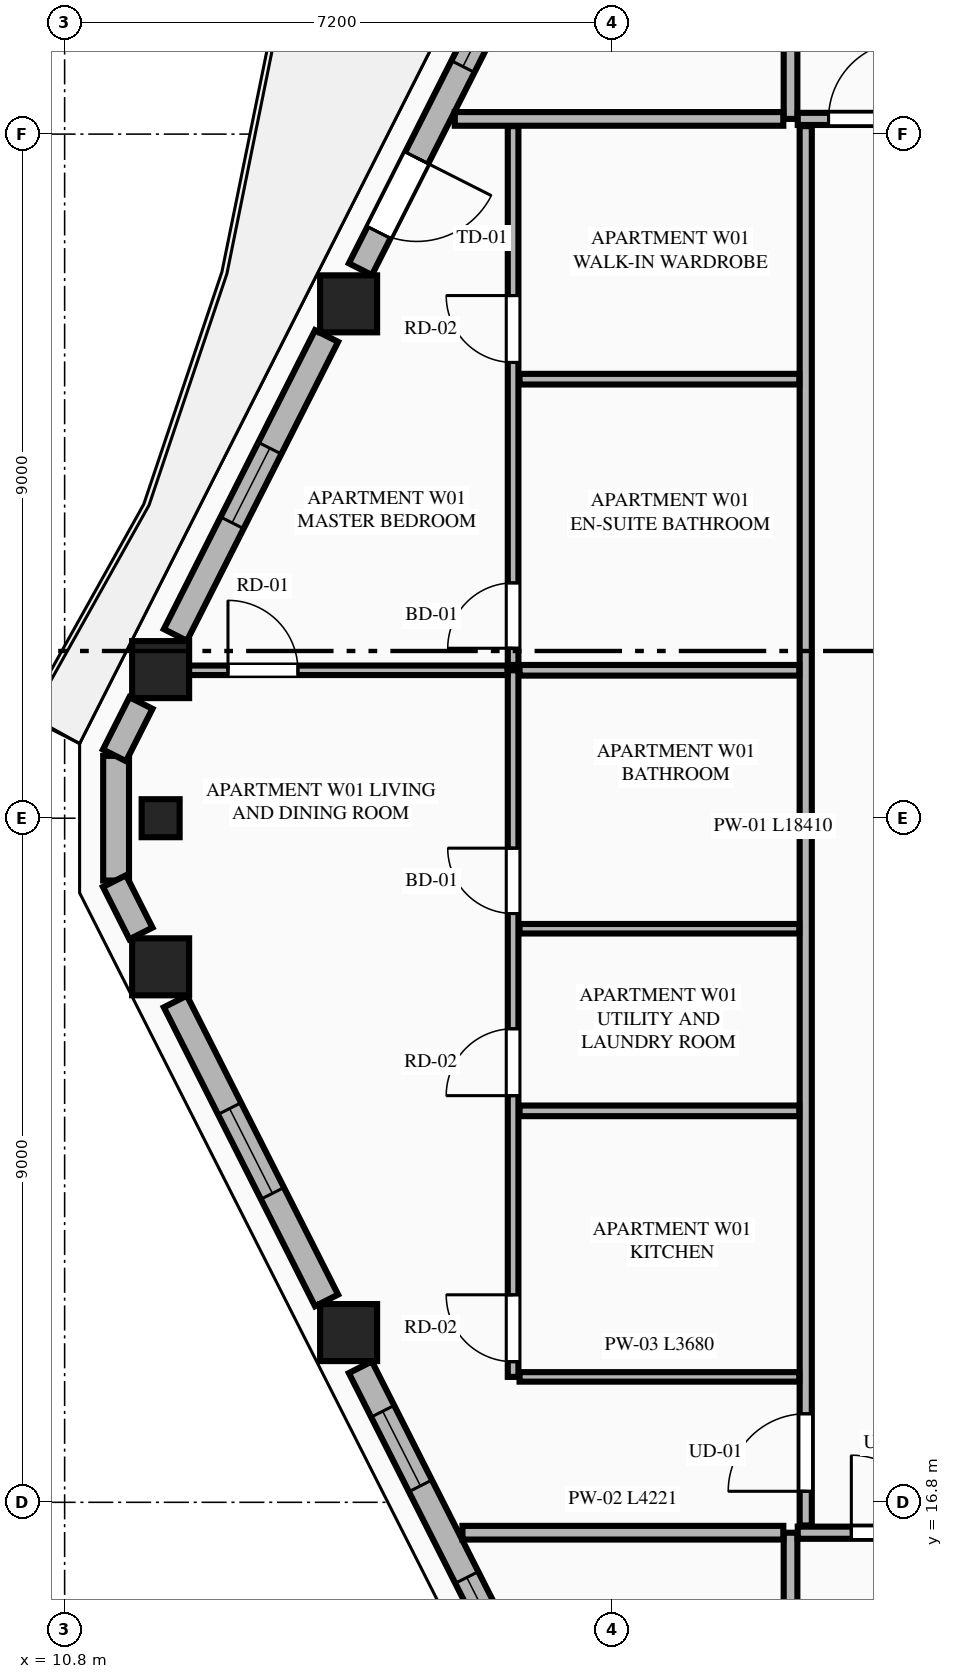
"""IFC4 building model, lengths in metres.
Left out: names, types, materials, properties, quantities, classifications, styles, units other than length and angle.
Written with IfcOpenShell. Run it as: python <this file> out.ifc"""

import sys

from ifc_helpers import new_model, si_unit, direction, frame, frame_2d, origin, origin_2d, place, context, subcontext, project, spatial, rectangle, extrude, element, fill, save


model = new_model("IFC4")
c1 = context("Model", 3, precision=1e-05, world=origin(), true_north=direction((0.0, 1.0)))
c2 = subcontext(c1, "Body", "Model", "MODEL_VIEW")
j1 = project(units=[si_unit("LENGTHUNIT", "METRE"), si_unit("PLANEANGLEUNIT", "RADIAN")], contexts=[c1])
p1 = place(None, origin())
s1 = spatial("IfcSite", under=j1, at=p1, CompositionType="ELEMENT")
p2 = place(p1, origin())
s2 = spatial("IfcBuilding", under=s1, at=p2, CompositionType="ELEMENT")
p3 = place(p2, frame((0.0, 0.0, 230.65)))
s3 = spatial("IfcBuildingStorey", under=s2, at=p3, CompositionType="ELEMENT", Elevation=230.65)
for number, where, z_axis, x_axis in (
    (1, (14.536, 32.567, 0.0), (0.0, 0.0, 1.0), (1.0, 0.0, 0.0)),
    (2, (12.063, 27.755, 0.0), (0.0, 0.0, 1.0), (1.0, 0.0, 0.0)),
    (3, (12.063, 23.845, 0.0), (0.0, 0.0, 1.0), (1.0, 0.0, 0.0)),
    (4, (14.536, 19.033, 0.0), (0.0, 0.0, 1.0), (1.0, 0.0, 0.0)),
):
    element("IfcColumn", number, at=place(p3, frame(where, z_axis=z_axis, x_axis=x_axis)), inside=s3, PredefinedType="COLUMN", context=c2, shape_type="SweptSolid", body=[
        extrude(rectangle(XDim=0.75, YDim=0.75, at=origin_2d()), origin(), (0.0, 0.0, 1.0), 3.65),
    ])
p4 = place(p3, frame((12.063, 25.8, 0.0), z_axis=(0.0, 0.0, 1.0), x_axis=(0.0, -1.0, 0.0)))
e5 = element("IfcColumn", 5, at=p4, inside=s3, PredefinedType="PILASTER", context=c2, shape_type="SweptSolid", body=[
    extrude(rectangle(XDim=0.5, YDim=0.35, at=origin_2d()), origin(), (0.0, 0.0, 1.0), 3.65),
])
p5 = place(p3, frame((11.477, 26.62, 0.0), z_axis=(0.0, 0.0, 1.0), x_axis=(0.0, -1.0, 0.0)))
e6 = element("IfcWall", 6, at=p5, inside=s3, PredefinedType="STANDARD", context=c2, shape_type="SweptSolid", body=[
    extrude(rectangle(XDim=1.64, YDim=0.34, at=frame_2d((0.82, 0.0))), origin(), (0.0, 0.0, 1.0), 3.45),
])
p6 = place(p3, frame((16.768, 37.127, 0.0), z_axis=(0.0, 0.0, 1.0), x_axis=(-0.451581819983, -0.892229712496, 0.0)))
e7 = element("IfcWall", 7, at=p6, inside=s3, PredefinedType="STANDARD", context=c2, shape_type="SweptSolid", body=[
    extrude(rectangle(XDim=4.6, YDim=0.34, at=frame_2d((2.3, 0.0))), origin(), (0.0, 0.0, 1.0), 2.983),
])
p7 = place(p6, frame((2.958, 0.0, 0.0)))
e8 = element("IfcOpeningElement", 8, at=p7, cuts=e7, PredefinedType="OPENING", context=c2, shape_type="SweptSolid", body=[
    extrude(rectangle(XDim=1.1, YDim=2.25, at=frame_2d((0.55, 1.125))), frame((0.0, 0.18, 0.0), z_axis=(0.0, -1.0, 0.0), x_axis=(1.0, 0.0, 0.0)), (0.0, 0.0, 1.0), 0.36),
])
p8 = place(p6, frame((0.512, 0.0, 0.75)))
e9 = element("IfcOpeningElement", 9, at=p8, cuts=e7, PredefinedType="OPENING", context=c2, shape_type="SweptSolid", body=[
    extrude(rectangle(XDim=1.1, YDim=2.0, at=frame_2d((0.55, 1.0))), frame((0.0, 0.18, 0.0), z_axis=(0.0, -1.0, 0.0), x_axis=(1.0, 0.0, 0.0)), (0.0, 0.0, 1.0), 0.36),
])
p9 = place(p3, frame((14.246, 32.144, 0.0), z_axis=(0.0, 0.0, 1.0), x_axis=(-0.451285866323, -0.892379441077, 0.0)))
e10 = element("IfcWall", 10, at=p9, inside=s3, PredefinedType="STANDARD", context=c2, shape_type="SweptSolid", body=[
    extrude(rectangle(XDim=4.407, YDim=0.34, at=frame_2d((2.204, 0.0))), origin(), (0.0, 0.0, 1.0), 2.983),
])
p10 = place(p9, frame((1.654, 0.0, 0.75)))
e11 = element("IfcOpeningElement", 11, at=p10, cuts=e10, PredefinedType="OPENING", context=c2, shape_type="SweptSolid", body=[
    extrude(rectangle(XDim=1.1, YDim=2.0, at=frame_2d((0.55, 1.0))), frame((0.0, 0.18, 0.0), z_axis=(0.0, -1.0, 0.0), x_axis=(1.0, 0.0, 0.0)), (0.0, 0.0, 1.0), 0.36),
])
for number, where, z_axis, x_axis in (
    (12, (11.804, 27.316, 0.0), (0.0, 0.0, 1.0), (-0.451, -0.893, 0.0)),
    (13, (11.456, 24.973, 0.0), (0.0, 0.0, 1.0), (0.451, -0.893, 0.0)),
):
    element("IfcWall", number, at=place(p3, frame(where, z_axis=z_axis, x_axis=x_axis)), inside=s3, PredefinedType="STANDARD", context=c2, shape_type="SweptSolid", body=[
        extrude(rectangle(XDim=0.772, YDim=0.34, at=frame_2d((0.386, 0.0))), origin(), (0.0, 0.0, 1.0), 3.45),
    ])
p11 = place(p3, frame((12.257, 23.389, 0.0), z_axis=(0.0, 0.0, 1.0), x_axis=(0.45130817501, -0.892368158984, 0.0)))
e14 = element("IfcWall", 14, at=p11, inside=s3, PredefinedType="STANDARD", context=c2, shape_type="SweptSolid", body=[
    extrude(rectangle(XDim=4.407, YDim=0.34, at=frame_2d((2.204, 0.0))), origin(), (0.0, 0.0, 1.0), 2.983),
])
p12 = place(p11, frame((1.579, 0.0, 0.75)))
e15 = element("IfcOpeningElement", 15, at=p12, cuts=e14, PredefinedType="OPENING", context=c2, shape_type="SweptSolid", body=[
    extrude(rectangle(XDim=1.25, YDim=1.95, at=frame_2d((0.625, 0.975))), frame((0.0, 0.18, 0.0), z_axis=(0.0, -1.0, 0.0), x_axis=(1.0, 0.0, 0.0)), (0.0, 0.0, 1.0), 0.36),
])
p13 = place(p3, frame((14.691, 18.577, 0.0), z_axis=(0.0, 0.0, 1.0), x_axis=(0.451581819983, -0.892229712496, 0.0)))
e16 = element("IfcWall", 16, at=p13, inside=s3, PredefinedType="STANDARD", context=c2, shape_type="SweptSolid", body=[
    extrude(rectangle(XDim=4.6, YDim=0.34, at=frame_2d((2.3, 0.0))), origin(), (0.0, 0.0, 1.0), 2.983),
])
p14 = place(p13, frame((0.649, 0.0, 0.75)))
e17 = element("IfcOpeningElement", 17, at=p14, cuts=e16, PredefinedType="OPENING", context=c2, shape_type="SweptSolid", body=[
    extrude(rectangle(XDim=1.1, YDim=2.0, at=frame_2d((0.55, 1.0))), frame((0.0, 0.18, 0.0), z_axis=(0.0, -1.0, 0.0), x_axis=(1.0, 0.0, 0.0)), (0.0, 0.0, 1.0), 0.36),
])
p15 = place(p13, frame((3.1, 0.0, 0.75)))
e18 = element("IfcOpeningElement", 18, at=p15, cuts=e16, PredefinedType="OPENING", context=c2, shape_type="SweptSolid", body=[
    extrude(rectangle(XDim=1.1, YDim=2.0, at=frame_2d((0.55, 1.0))), frame((0.0, 0.18, 0.0), z_axis=(0.0, -1.0, 0.0), x_axis=(1.0, 0.0, 0.0)), (0.0, 0.0, 1.0), 0.36),
])
p16 = place(p3, frame((20.35, 8.119, 0.0), z_axis=(0.0, 0.0, 1.0), x_axis=(0.0, 1.0, 0.0)))
e19 = element("IfcWall", 19, at=p16, inside=s3, PredefinedType="PARTITIONING", context=c2, shape_type="SweptSolid", body=[
    extrude(rectangle(XDim=8.281, YDim=0.18, at=frame_2d((4.141, 0.0))), origin(), (0.0, 0.0, 1.0), 3.45),
])
p17 = place(p3, frame((20.445, 16.4, 0.0), z_axis=(0.0, 0.0, 1.0), x_axis=(1.0, 0.0, 0.0)))
e20 = element("IfcWall", 20, at=p17, inside=s3, PredefinedType="PARTITIONING", context=c2, shape_type="SweptSolid", body=[
    extrude(rectangle(XDim=8.606, YDim=0.16, at=frame_2d((4.303, 0.0))), origin(), (0.0, 0.0, 1.0), 3.45),
])
p18 = place(p17, frame((0.705, 0.0, 0.0)))
e21 = element("IfcOpeningElement", 21, at=p18, cuts=e20, PredefinedType="OPENING", context=c2, shape_type="SweptSolid", body=[
    extrude(rectangle(XDim=1.02, YDim=2.25, at=frame_2d((0.51, 1.125))), frame((0.0, 0.09, 0.0), z_axis=(0.0, -1.0, 0.0), x_axis=(1.0, 0.0, 0.0)), (0.0, 0.0, 1.0), 0.18),
])
p19 = place(p3, frame((20.35, 35.0, 0.0), z_axis=(0.0, 0.0, 1.0), x_axis=(0.0, 1.0, 0.0)))
e22 = element("IfcWall", 22, at=p19, inside=s3, PredefinedType="PARTITIONING", context=c2, shape_type="SweptSolid", body=[
    extrude(rectangle(XDim=8.481, YDim=0.18, at=frame_2d((4.24, 0.0))), origin(), (0.0, 0.0, 1.0), 3.45),
])
p20 = place(p3, frame((20.445, 35.0, 0.0), z_axis=(0.0, 0.0, 1.0), x_axis=(1.0, 0.0, 0.0)))
e23 = element("IfcWall", 23, at=p20, inside=s3, PredefinedType="PARTITIONING", context=c2, shape_type="SweptSolid", body=[
    extrude(rectangle(XDim=8.606, YDim=0.16, at=frame_2d((4.303, 0.0))), origin(), (0.0, 0.0, 1.0), 3.45),
])
p21 = place(p20, frame((0.405, 0.0, 0.0)))
e24 = element("IfcOpeningElement", 24, at=p21, cuts=e23, PredefinedType="OPENING", context=c2, shape_type="SweptSolid", body=[
    extrude(rectangle(XDim=1.02, YDim=2.25, at=frame_2d((0.51, 1.125))), frame((0.0, 0.09, 0.0), z_axis=(0.0, -1.0, 0.0), x_axis=(1.0, 0.0, 0.0)), (0.0, 0.0, 1.0), 0.18),
])
p22 = place(p3, frame((16.034, 16.4, 0.0), z_axis=(0.0, 0.0, 1.0), x_axis=(1.0, 0.0, 0.0)))
e25 = element("IfcWall", 25, at=p22, inside=s3, PredefinedType="PARTITIONING", context=c2, shape_type="SweptSolid", body=[
    extrude(rectangle(XDim=4.221, YDim=0.18, at=frame_2d((2.11, 0.0))), origin(), (0.0, 0.0, 1.0), 3.45),
])
p23 = place(p3, frame((15.933, 35.0, 0.0), z_axis=(0.0, 0.0, 1.0), x_axis=(1.0, 0.0, 0.0)))
e26 = element("IfcWall", 26, at=p23, inside=s3, PredefinedType="PARTITIONING", context=c2, shape_type="SweptSolid", body=[
    extrude(rectangle(XDim=4.322, YDim=0.18, at=frame_2d((2.161, 0.0))), origin(), (0.0, 0.0, 1.0), 3.45),
])
p24 = place(p3, frame((20.55, 16.495, 0.0), z_axis=(0.0, 0.0, 1.0), x_axis=(0.0, 1.0, 0.0)))
e27 = element("IfcWall", 27, at=p24, inside=s3, PredefinedType="PARTITIONING", context=c2, shape_type="SweptSolid", body=[
    extrude(rectangle(XDim=18.41, YDim=0.16, at=frame_2d((9.205, 0.0))), origin(), (0.0, 0.0, 1.0), 3.137),
])
p25 = place(p24, frame((0.45, 0.0, 0.0)))
e28 = element("IfcOpeningElement", 28, at=p25, cuts=e27, PredefinedType="OPENING", context=c2, shape_type="SweptSolid", body=[
    extrude(rectangle(XDim=1.02, YDim=2.25, at=frame_2d((0.51, 1.125))), frame((0.0, 0.09, 0.0), z_axis=(0.0, -1.0, 0.0), x_axis=(1.0, 0.0, 0.0)), (0.0, 0.0, 1.0), 0.18),
])
p26 = place(p3, frame((16.785, 18.45, 0.0), z_axis=(0.0, 0.0, 1.0), x_axis=(1.0, 0.0, 0.0)))
e29 = element("IfcWall", 29, at=p26, inside=s3, PredefinedType="PARTITIONING", context=c2, shape_type="SweptSolid", body=[
    extrude(rectangle(XDim=3.68, YDim=0.125, at=frame_2d((1.84, 0.0))), origin(), (0.0, 0.0, 1.0), 3.45),
])
p27 = place(p3, frame((16.7, 18.45, 0.0), z_axis=(0.0, 0.0, 1.0), x_axis=(0.0, 1.0, 0.0)))
e30 = element("IfcWall", 30, at=p27, inside=s3, PredefinedType="PLUMBINGWALL", context=c2, shape_type="SweptSolid", body=[
    extrude(rectangle(XDim=9.296, YDim=0.14, at=frame_2d((4.648, 0.0))), origin(), (0.0, 0.0, 1.0), 3.45),
])
p28 = place(p27, frame((0.2, 0.0, 0.0)))
e31 = element("IfcOpeningElement", 31, at=p28, cuts=e30, PredefinedType="OPENING", context=c2, shape_type="SweptSolid", body=[
    extrude(rectangle(XDim=0.88, YDim=2.15, at=frame_2d((0.44, 1.075))), frame((0.0, 0.08, 0.0), z_axis=(0.0, -1.0, 0.0), x_axis=(1.0, 0.0, 0.0)), (0.0, 0.0, 1.0), 0.16),
])
p29 = place(p27, frame((3.7, 0.0, 0.0)))
e32 = element("IfcOpeningElement", 32, at=p29, cuts=e30, PredefinedType="OPENING", context=c2, shape_type="SweptSolid", body=[
    extrude(rectangle(XDim=0.88, YDim=2.15, at=frame_2d((0.44, 1.075))), frame((0.0, 0.08, 0.0), z_axis=(0.0, -1.0, 0.0), x_axis=(1.0, 0.0, 0.0)), (0.0, 0.0, 1.0), 0.16),
])
p30 = place(p27, frame((6.096, 0.0, 0.0)))
e33 = element("IfcOpeningElement", 33, at=p30, cuts=e30, PredefinedType="OPENING", context=c2, shape_type="SweptSolid", body=[
    extrude(rectangle(XDim=0.86, YDim=2.1, at=frame_2d((0.43, 1.05))), frame((0.0, 0.08, 0.0), z_axis=(0.0, -1.0, 0.0), x_axis=(1.0, 0.0, 0.0)), (0.0, 0.0, 1.0), 0.16),
])
p31 = place(p3, frame((16.7, 27.816, 0.0), z_axis=(0.0, 0.0, 1.0), x_axis=(0.0, 1.0, 0.0)))
e34 = element("IfcWall", 34, at=p31, inside=s3, PredefinedType="PLUMBINGWALL", context=c2, shape_type="SweptSolid", body=[
    extrude(rectangle(XDim=7.089, YDim=0.14, at=frame_2d((3.544, 0.0))), origin(), (0.0, 0.0, 1.0), 3.45),
])
p32 = place(p31, frame((0.22, 0.0, 0.0)))
e35 = element("IfcOpeningElement", 35, at=p32, cuts=e34, PredefinedType="OPENING", context=c2, shape_type="SweptSolid", body=[
    extrude(rectangle(XDim=0.86, YDim=2.1, at=frame_2d((0.43, 1.05))), frame((0.0, 0.08, 0.0), z_axis=(0.0, -1.0, 0.0), x_axis=(1.0, 0.0, 0.0)), (0.0, 0.0, 1.0), 0.16),
])
p33 = place(p31, frame((3.98, 0.0, 0.0)))
e36 = element("IfcOpeningElement", 36, at=p33, cuts=e34, PredefinedType="OPENING", context=c2, shape_type="SweptSolid", body=[
    extrude(rectangle(XDim=0.88, YDim=2.15, at=frame_2d((0.44, 1.075))), frame((0.0, 0.08, 0.0), z_axis=(0.0, -1.0, 0.0), x_axis=(1.0, 0.0, 0.0)), (0.0, 0.0, 1.0), 0.16),
])
p34 = place(p3, frame((16.785, 27.746, 0.0), z_axis=(0.0, 0.0, 1.0), x_axis=(1.0, 0.0, 0.0)))
e37 = element("IfcWall", 37, at=p34, inside=s3, PredefinedType="PLUMBINGWALL", context=c2, shape_type="SweptSolid", body=[
    extrude(rectangle(XDim=3.68, YDim=0.14, at=frame_2d((1.84, 0.0))), origin(), (0.0, 0.0, 1.0), 2.907),
])
p35 = place(p3, frame((12.249, 27.746, 0.0), z_axis=(0.0, 0.0, 1.0), x_axis=(1.0, 0.0, 0.0)))
e38 = element("IfcWall", 38, at=p35, inside=s3, PredefinedType="PARTITIONING", context=c2, shape_type="SweptSolid", body=[
    extrude(rectangle(XDim=4.376, YDim=0.125, at=frame_2d((2.188, 0.0))), origin(), (0.0, 0.0, 1.0), 2.907),
])
p36 = place(p35, frame((0.7, 0.0, 0.0)))
e39 = element("IfcOpeningElement", 39, at=p36, cuts=e38, PredefinedType="OPENING", context=c2, shape_type="SweptSolid", body=[
    extrude(rectangle(XDim=0.92, YDim=2.15, at=frame_2d((0.46, 1.075))), frame((0.0, 0.073, 0.0), z_axis=(0.0, -1.0, 0.0), x_axis=(1.0, 0.0, 0.0)), (0.0, 0.0, 1.0), 0.145),
])
p37 = place(p3, frame((16.785, 21.95, 0.0), z_axis=(0.0, 0.0, 1.0), x_axis=(1.0, 0.0, 0.0)))
e40 = element("IfcWall", 40, at=p37, inside=s3, PredefinedType="PLUMBINGWALL", context=c2, shape_type="SweptSolid", body=[
    extrude(rectangle(XDim=3.68, YDim=0.14, at=frame_2d((1.84, 0.0))), origin(), (0.0, 0.0, 1.0), 3.45),
])
p38 = place(p3, frame((16.785, 24.346, 0.0), z_axis=(0.0, 0.0, 1.0), x_axis=(1.0, 0.0, 0.0)))
e41 = element("IfcWall", 41, at=p38, inside=s3, PredefinedType="PARTITIONING", context=c2, shape_type="SweptSolid", body=[
    extrude(rectangle(XDim=3.68, YDim=0.125, at=frame_2d((1.84, 0.0))), origin(), (0.0, 0.0, 1.0), 3.45),
])
p39 = place(p3, frame((16.785, 31.576, 0.0), z_axis=(0.0, 0.0, 1.0), x_axis=(1.0, 0.0, 0.0)))
e42 = element("IfcWall", 42, at=p39, inside=s3, PredefinedType="PLUMBINGWALL", context=c2, shape_type="SweptSolid", body=[
    extrude(rectangle(XDim=3.68, YDim=0.14, at=frame_2d((1.84, 0.0))), origin(), (0.0, 0.0, 1.0), 3.45),
])
p40 = place(p7, origin())
e43 = element("IfcDoor", 43, at=p40, inside=s3, OperationType="SINGLE_SWING_LEFT", PredefinedType="DOOR", context=c2, shape_type="SweptSolid", body=[
    extrude(rectangle(XDim=1.1, YDim=2.25, at=frame_2d((0.55, 1.125))), frame((0.0, 0.025, 0.0), z_axis=(0.0, -1.0, 0.0), x_axis=(1.0, 0.0, 0.0)), (0.0, 0.0, 1.0), 0.05),
])
fill(e8, e43)
p41 = place(p10, origin())
e44 = element("IfcWindow", 44, at=p41, inside=s3, PartitioningType="SINGLE_PANEL", PredefinedType="WINDOW", context=c2, shape_type="SweptSolid", body=[
    extrude(rectangle(XDim=1.1, YDim=2.0, at=frame_2d((0.55, 1.0))), frame((0.0, 0.03, 0.0), z_axis=(0.0, -1.0, 0.0), x_axis=(1.0, 0.0, 0.0)), (0.0, 0.0, 1.0), 0.06),
])
fill(e11, e44)
p42 = place(p12, origin())
e45 = element("IfcWindow", 45, at=p42, inside=s3, PartitioningType="SINGLE_PANEL", PredefinedType="WINDOW", context=c2, shape_type="SweptSolid", body=[
    extrude(rectangle(XDim=1.25, YDim=1.95, at=frame_2d((0.625, 0.975))), frame((0.0, 0.03, 0.0), z_axis=(0.0, -1.0, 0.0), x_axis=(1.0, 0.0, 0.0)), (0.0, 0.0, 1.0), 0.06),
])
fill(e15, e45)
p43 = place(p14, origin())
e46 = element("IfcWindow", 46, at=p43, inside=s3, PartitioningType="SINGLE_PANEL", PredefinedType="WINDOW", context=c2, shape_type="SweptSolid", body=[
    extrude(rectangle(XDim=1.1, YDim=2.0, at=frame_2d((0.55, 1.0))), frame((0.0, 0.03, 0.0), z_axis=(0.0, -1.0, 0.0), x_axis=(1.0, 0.0, 0.0)), (0.0, 0.0, 1.0), 0.06),
])
fill(e17, e46)
p44 = place(p18, origin())
e47 = element("IfcDoor", 47, at=p44, inside=s3, OperationType="SINGLE_SWING_LEFT", PredefinedType="DOOR", context=c2, shape_type="SweptSolid", body=[
    extrude(rectangle(XDim=1.02, YDim=2.25, at=frame_2d((0.51, 1.125))), frame((0.0, 0.025, 0.0), z_axis=(0.0, -1.0, 0.0), x_axis=(1.0, 0.0, 0.0)), (0.0, 0.0, 1.0), 0.05),
])
fill(e21, e47)
p45 = place(p21, origin())
e48 = element("IfcDoor", 48, at=p45, inside=s3, OperationType="SINGLE_SWING_RIGHT", PredefinedType="DOOR", context=c2, shape_type="SweptSolid", body=[
    extrude(rectangle(XDim=1.02, YDim=2.25, at=frame_2d((0.51, 1.125))), frame((0.0, 0.025, 0.0), z_axis=(0.0, -1.0, 0.0), x_axis=(1.0, 0.0, 0.0)), (0.0, 0.0, 1.0), 0.05),
])
fill(e24, e48)
p46 = place(p28, origin())
e49 = element("IfcDoor", 49, at=p46, inside=s3, OperationType="SINGLE_SWING_RIGHT", PredefinedType="DOOR", context=c2, shape_type="SweptSolid", body=[
    extrude(rectangle(XDim=0.88, YDim=2.15, at=frame_2d((0.44, 1.075))), frame((0.0, 0.025, 0.0), z_axis=(0.0, -1.0, 0.0), x_axis=(1.0, 0.0, 0.0)), (0.0, 0.0, 1.0), 0.05),
])
fill(e31, e49)
p47 = place(p29, origin())
e50 = element("IfcDoor", 50, at=p47, inside=s3, OperationType="SINGLE_SWING_LEFT", PredefinedType="DOOR", context=c2, shape_type="SweptSolid", body=[
    extrude(rectangle(XDim=0.88, YDim=2.15, at=frame_2d((0.44, 1.075))), frame((0.0, 0.025, 0.0), z_axis=(0.0, -1.0, 0.0), x_axis=(1.0, 0.0, 0.0)), (0.0, 0.0, 1.0), 0.05),
])
fill(e32, e50)
p48 = place(p30, origin())
e51 = element("IfcDoor", 51, at=p48, inside=s3, OperationType="SINGLE_SWING_RIGHT", PredefinedType="DOOR", context=c2, shape_type="SweptSolid", body=[
    extrude(rectangle(XDim=0.86, YDim=2.1, at=frame_2d((0.43, 1.05))), frame((0.0, 0.025, 0.0), z_axis=(0.0, -1.0, 0.0), x_axis=(1.0, 0.0, 0.0)), (0.0, 0.0, 1.0), 0.05),
])
fill(e33, e51)
p49 = place(p32, origin())
e52 = element("IfcDoor", 52, at=p49, inside=s3, OperationType="SINGLE_SWING_LEFT", PredefinedType="DOOR", context=c2, shape_type="SweptSolid", body=[
    extrude(rectangle(XDim=0.86, YDim=2.1, at=frame_2d((0.43, 1.05))), frame((0.0, 0.025, 0.0), z_axis=(0.0, -1.0, 0.0), x_axis=(1.0, 0.0, 0.0)), (0.0, 0.0, 1.0), 0.05),
])
fill(e35, e52)
p50 = place(p33, origin())
e53 = element("IfcDoor", 53, at=p50, inside=s3, OperationType="SINGLE_SWING_RIGHT", PredefinedType="DOOR", context=c2, shape_type="SweptSolid", body=[
    extrude(rectangle(XDim=0.88, YDim=2.15, at=frame_2d((0.44, 1.075))), frame((0.0, 0.025, 0.0), z_axis=(0.0, -1.0, 0.0), x_axis=(1.0, 0.0, 0.0)), (0.0, 0.0, 1.0), 0.05),
])
fill(e36, e53)
p51 = place(p25, origin())
e54 = element("IfcDoor", 54, at=p51, inside=s3, OperationType="SINGLE_SWING_LEFT", PredefinedType="DOOR", context=c2, shape_type="SweptSolid", body=[
    extrude(rectangle(XDim=1.02, YDim=2.25, at=frame_2d((0.51, 1.125))), frame((0.0, 0.025, 0.0), z_axis=(0.0, -1.0, 0.0), x_axis=(1.0, 0.0, 0.0)), (0.0, 0.0, 1.0), 0.05),
])
fill(e28, e54)
p52 = place(p36, origin())
e55 = element("IfcDoor", 55, at=p52, inside=s3, OperationType="SINGLE_SWING_LEFT", PredefinedType="DOOR", context=c2, shape_type="SweptSolid", body=[
    extrude(rectangle(XDim=0.92, YDim=2.15, at=frame_2d((0.46, 1.075))), frame((0.0, 0.025, 0.0), z_axis=(0.0, -1.0, 0.0), x_axis=(1.0, 0.0, 0.0)), (0.0, 0.0, 1.0), 0.05),
])
fill(e39, e55)
p53 = place(p8, origin())
e56 = element("IfcWindow", 56, at=p53, inside=s3, PartitioningType="SINGLE_PANEL", PredefinedType="WINDOW", context=c2, shape_type="SweptSolid", body=[
    extrude(rectangle(XDim=1.1, YDim=2.0, at=frame_2d((0.55, 1.0))), frame((0.0, 0.03, 0.0), z_axis=(0.0, -1.0, 0.0), x_axis=(1.0, 0.0, 0.0)), (0.0, 0.0, 1.0), 0.06),
])
fill(e9, e56)
p54 = place(p15, origin())
e57 = element("IfcWindow", 57, at=p54, inside=s3, PartitioningType="SINGLE_PANEL", PredefinedType="WINDOW", context=c2, shape_type="SweptSolid", body=[
    extrude(rectangle(XDim=1.1, YDim=2.0, at=frame_2d((0.55, 1.0))), frame((0.0, 0.03, 0.0), z_axis=(0.0, -1.0, 0.0), x_axis=(1.0, 0.0, 0.0)), (0.0, 0.0, 1.0), 0.06),
])
fill(e18, e57)
save(model, sys.argv[1])
